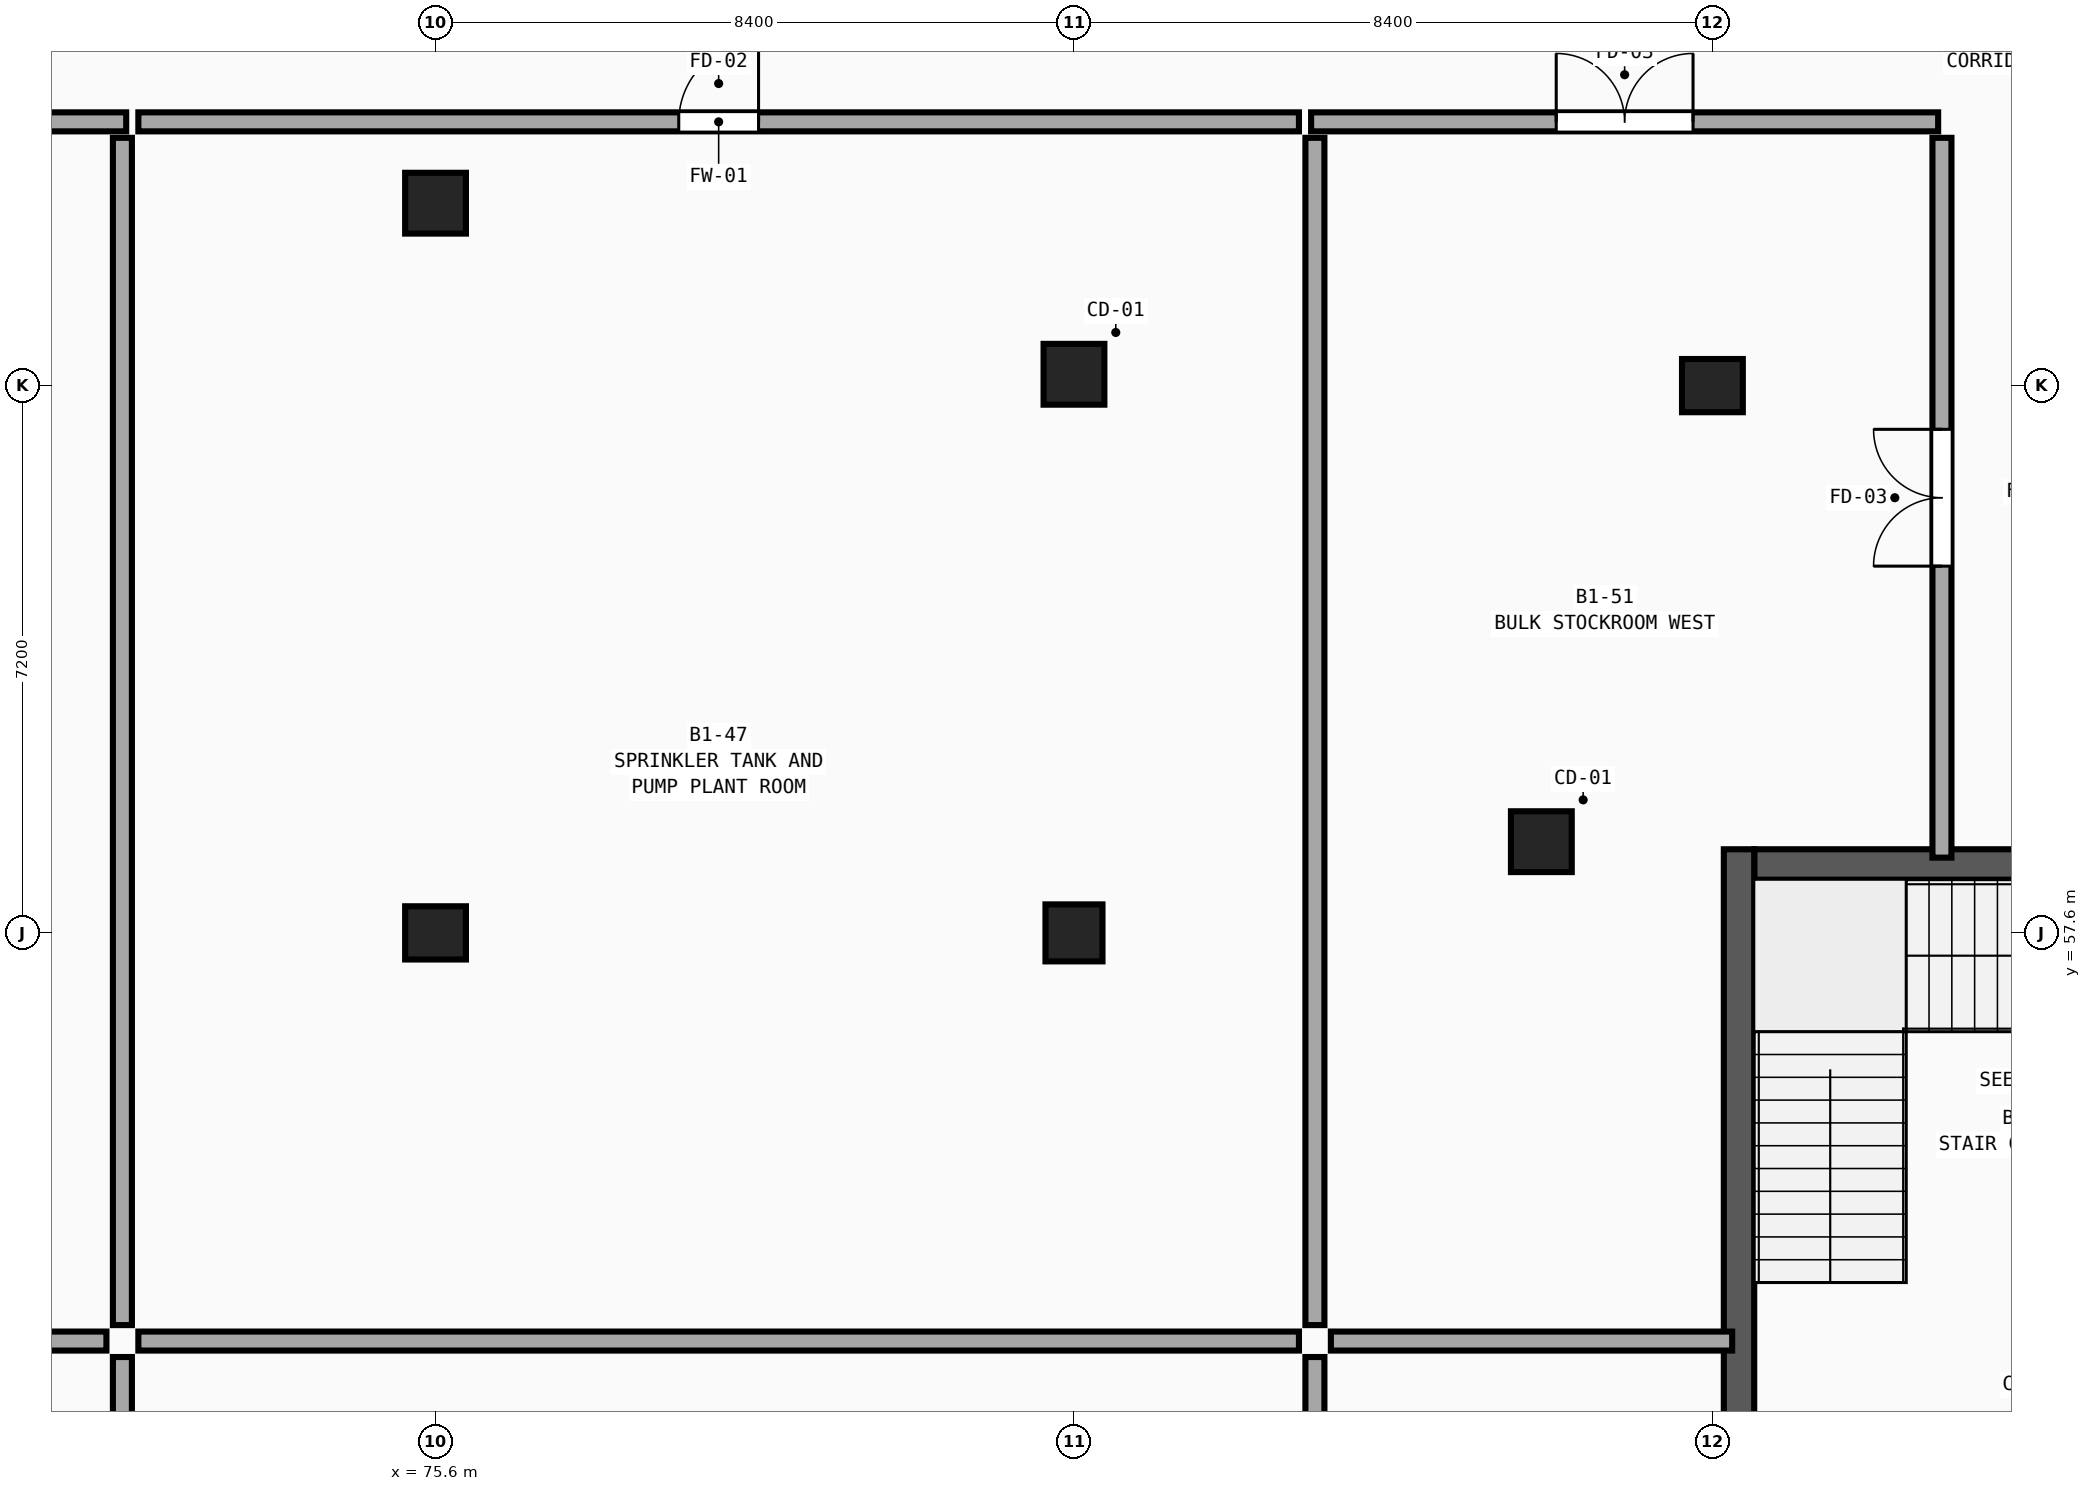
"""IFC4 building model, lengths in metres.
Left out: names, types, materials, properties, quantities, classifications, styles, units other than length and angle.
Written with IfcOpenShell. Run it as: python <this file> out.ifc"""

import sys

from ifc_helpers import new_model, si_unit, direction, frame, frame_2d, origin, origin_2d, place, context, subcontext, project, spatial, rectangle, circle, extrude, element, fill, save


model = new_model("IFC4")
c1 = context("Model", 3, precision=1e-05, world=origin(), true_north=direction((0.0, 1.0)))
c2 = subcontext(c1, "Body", "Model", "MODEL_VIEW")
j1 = project(units=[si_unit("LENGTHUNIT", "METRE"), si_unit("PLANEANGLEUNIT", "RADIAN")], contexts=[c1])
p1 = place(None, origin())
s1 = spatial("IfcSite", under=j1, at=p1, CompositionType="ELEMENT")
p2 = place(p1, origin())
s2 = spatial("IfcBuilding", under=s1, at=p2, CompositionType="ELEMENT")
p3 = place(p2, frame((0.0, 0.0, -5.4)))
s3 = spatial("IfcBuildingStorey", under=s2, at=p3, CompositionType="ELEMENT", Elevation=-5.4)
p4 = place(p3, frame((75.6, 57.6, 0.0), z_axis=(0.0, 0.0, 1.0), x_axis=(1.0, 0.0, 0.0)))
e1 = element("IfcColumn", 1, at=p4, inside=s3, PredefinedType="COLUMN", context=c2, shape_type="SweptSolid", body=[
    extrude(rectangle(XDim=0.8, YDim=0.7, at=origin_2d()), origin(), (0.0, 0.0, 1.0), 5.4),
])
p5 = place(p3, frame((84.0, 57.6, 0.0), z_axis=(0.0, 0.0, 1.0), x_axis=(1.0, 0.0, 0.0)))
e2 = element("IfcColumn", 2, at=p5, inside=s3, PredefinedType="COLUMN", context=c2, shape_type="SweptSolid", body=[
    extrude(rectangle(XDim=0.75, YDim=0.75, at=origin_2d()), origin(), (0.0, 0.0, 1.0), 5.4),
])
p6 = place(p3, frame((92.4, 64.8, 0.0), z_axis=(0.0, 0.0, 1.0), x_axis=(1.0, 0.0, 0.0)))
e3 = element("IfcColumn", 3, at=p6, inside=s3, PredefinedType="COLUMN", context=c2, shape_type="SweptSolid", body=[
    extrude(rectangle(XDim=0.8, YDim=0.7, at=origin_2d()), origin(), (0.0, 0.0, 1.0), 5.4),
])
for number, where, z_axis, x_axis in (
    (4, (90.149, 58.8, 0.0), (0.0, 0.0, 1.0), (1.0, 0.0, 0.0)),
    (5, (84.0, 64.949, 0.0), (0.0, 0.0, 1.0), (1.0, 0.0, 0.0)),
    (6, (75.6, 67.2, 0.0), (0.0, 0.0, 1.0), (1.0, 0.0, 0.0)),
):
    element("IfcColumn", number, at=place(p3, frame(where, z_axis=z_axis, x_axis=x_axis)), inside=s3, PredefinedType="COLUMN", context=c2, shape_type="SweptSolid", body=[
        extrude(circle(Radius=0.4, at=origin_2d()), origin(), (0.0, 0.0, 1.0), 5.4),
    ])
p7 = place(p3, frame((92.95, 58.5, 0.0), z_axis=(0.0, 0.0, 1.0), x_axis=(1.0, 0.0, 0.0)))
e7 = element("IfcWall", 7, at=p7, inside=s3, PredefinedType="SHEAR", context=c2, shape_type="SweptSolid", body=[
    extrude(rectangle(XDim=7.3, YDim=0.4, at=frame_2d((3.65, 0.0))), origin(), (0.0, 0.0, 1.0), 5.4),
])
p8 = place(p3, frame((92.75, 58.7, 0.0), z_axis=(0.0, 0.0, 1.0), x_axis=(0.0, -1.0, 0.0)))
e8 = element("IfcWall", 8, at=p8, inside=s3, PredefinedType="SHEAR", context=c2, shape_type="SweptSolid", body=[
    extrude(rectangle(XDim=8.25, YDim=0.4, at=frame_2d((4.125, 0.0))), origin(), (0.0, 0.0, 1.0), 5.4),
])
p9 = place(p3, frame((55.68, 68.27, 0.0), z_axis=(0.0, 0.0, 1.0), x_axis=(1.0, 0.0, 0.0)))
e9 = element("IfcWall", 9, at=p9, inside=s3, PredefinedType="SOLIDWALL", context=c2, shape_type="SweptSolid", body=[
    extrude(rectangle(XDim=15.85, YDim=0.25, at=frame_2d((7.925, 0.0))), origin(), (0.0, 0.0, 1.0), 5.05),
])
p10 = place(p9, frame((7.025, 0.0, 0.0)))
e10 = element("IfcOpeningElement", 10, at=p10, cuts=e9, PredefinedType="OPENING", context=c2, shape_type="SweptSolid", body=[
    extrude(rectangle(XDim=1.8, YDim=2.3, at=frame_2d((0.9, 1.15))), frame((0.0, 0.145, 0.0), z_axis=(0.0, -1.0, 0.0), x_axis=(1.0, 0.0, 0.0)), (0.0, 0.0, 1.0), 0.29),
])
p11 = place(p3, frame((71.69, 68.27, 0.0), z_axis=(0.0, 0.0, 1.0), x_axis=(1.0, 0.0, 0.0)))
e11 = element("IfcWall", 11, at=p11, inside=s3, PredefinedType="SOLIDWALL", context=c2, shape_type="SweptSolid", body=[
    extrude(rectangle(XDim=15.27, YDim=0.25, at=frame_2d((7.635, 0.0))), origin(), (0.0, 0.0, 1.0), 5.05),
])
p12 = place(p11, frame((7.11, 0.0, 0.0)))
e12 = element("IfcOpeningElement", 12, at=p12, cuts=e11, PredefinedType="OPENING", context=c2, shape_type="SweptSolid", body=[
    extrude(rectangle(XDim=1.05, YDim=2.15, at=frame_2d((0.525, 1.075))), frame((0.0, 0.145, 0.0), z_axis=(0.0, -1.0, 0.0), x_axis=(1.0, 0.0, 0.0)), (0.0, 0.0, 1.0), 0.29),
])
p13 = place(p3, frame((95.42, 58.59, 0.0), z_axis=(0.0, 0.0, 1.0), x_axis=(0.0, 1.0, 0.0)))
e13 = element("IfcWall", 13, at=p13, inside=s3, PredefinedType="SOLIDWALL", context=c2, shape_type="SweptSolid", body=[
    extrude(rectangle(XDim=9.47, YDim=0.25, at=frame_2d((4.735, 0.0))), origin(), (0.0, 0.0, 1.0), 5.05),
])
p14 = place(p13, frame((3.835, 0.0, 0.0)))
e14 = element("IfcOpeningElement", 14, at=p14, cuts=e13, PredefinedType="OPENING", context=c2, shape_type="SweptSolid", body=[
    extrude(rectangle(XDim=1.8, YDim=2.3, at=frame_2d((0.9, 1.15))), frame((0.0, 0.145, 0.0), z_axis=(0.0, -1.0, 0.0), x_axis=(1.0, 0.0, 0.0)), (0.0, 0.0, 1.0), 0.29),
])
p15 = place(p3, frame((87.12, 68.27, 0.0), z_axis=(0.0, 0.0, 1.0), x_axis=(1.0, 0.0, 0.0)))
e15 = element("IfcWall", 15, at=p15, inside=s3, PredefinedType="SOLIDWALL", context=c2, shape_type="SweptSolid", body=[
    extrude(rectangle(XDim=8.25, YDim=0.25, at=frame_2d((4.125, 0.0))), origin(), (0.0, 0.0, 1.0), 5.05),
])
p16 = place(p15, frame((3.225, 0.0, 0.0)))
e16 = element("IfcOpeningElement", 16, at=p16, cuts=e15, PredefinedType="OPENING", context=c2, shape_type="SweptSolid", body=[
    extrude(rectangle(XDim=1.8, YDim=2.3, at=frame_2d((0.9, 1.15))), frame((0.0, 0.145, 0.0), z_axis=(0.0, -1.0, 0.0), x_axis=(1.0, 0.0, 0.0)), (0.0, 0.0, 1.0), 0.29),
])
p17 = place(p3, frame((71.48, 34.505, 0.0), z_axis=(0.0, 0.0, 1.0), x_axis=(0.0, 1.0, 0.0)))
e17 = element("IfcWall", 17, at=p17, inside=s3, PredefinedType="SOLIDWALL", context=c2, shape_type="SweptSolid", body=[
    extrude(rectangle(XDim=17.515, YDim=0.25, at=frame_2d((8.758, 0.0))), origin(), (0.0, 0.0, 1.0), 5.05),
])
p18 = place(p17, frame((7.857, 0.0, 0.0)))
e18 = element("IfcOpeningElement", 18, at=p18, cuts=e17, PredefinedType="OPENING", context=c2, shape_type="SweptSolid", body=[
    extrude(rectangle(XDim=1.8, YDim=2.3, at=frame_2d((0.9, 1.15))), frame((0.0, 0.145, 0.0), z_axis=(0.0, -1.0, 0.0), x_axis=(1.0, 0.0, 0.0)), (0.0, 0.0, 1.0), 0.29),
])
p19 = place(p3, frame((87.17, 34.505, 0.0), z_axis=(0.0, 0.0, 1.0), x_axis=(0.0, 1.0, 0.0)))
e19 = element("IfcWall", 19, at=p19, inside=s3, PredefinedType="SOLIDWALL", context=c2, shape_type="SweptSolid", body=[
    extrude(rectangle(XDim=17.515, YDim=0.25, at=frame_2d((8.758, 0.0))), origin(), (0.0, 0.0, 1.0), 5.05),
])
for number, where, z_axis, x_axis in (
    (20, (71.48, 52.44, 0.0), (0.0, 0.0, 1.0), (0.0, 1.0, 0.0)),
    (21, (87.17, 52.44, 0.0), (0.0, 0.0, 1.0), (0.0, 1.0, 0.0)),
):
    element("IfcWall", number, at=place(p3, frame(where, z_axis=z_axis, x_axis=x_axis)), inside=s3, PredefinedType="SOLIDWALL", context=c2, shape_type="SweptSolid", body=[
        extrude(rectangle(XDim=15.62, YDim=0.25, at=frame_2d((7.81, 0.0))), origin(), (0.0, 0.0, 1.0), 5.05),
    ])
p20 = place(p3, frame((55.84, 52.23, 0.0), z_axis=(0.0, 0.0, 1.0), x_axis=(1.0, 0.0, 0.0)))
e22 = element("IfcWall", 22, at=p20, inside=s3, PredefinedType="SOLIDWALL", context=c2, shape_type="SweptSolid", body=[
    extrude(rectangle(XDim=15.43, YDim=0.25, at=frame_2d((7.715, 0.0))), origin(), (0.0, 0.0, 1.0), 5.05),
])
p21 = place(p3, frame((71.69, 52.23, 0.0), z_axis=(0.0, 0.0, 1.0), x_axis=(1.0, 0.0, 0.0)))
e23 = element("IfcWall", 23, at=p21, inside=s3, PredefinedType="SOLIDWALL", context=c2, shape_type="SweptSolid", body=[
    extrude(rectangle(XDim=15.27, YDim=0.25, at=frame_2d((7.635, 0.0))), origin(), (0.0, 0.0, 1.0), 5.05),
])
p22 = place(p3, frame((87.38, 52.23, 0.0), z_axis=(0.0, 0.0, 1.0), x_axis=(1.0, 0.0, 0.0)))
e24 = element("IfcWall", 24, at=p22, inside=s3, PredefinedType="SOLIDWALL", context=c2, shape_type="SweptSolid", body=[
    extrude(rectangle(XDim=5.28, YDim=0.25, at=frame_2d((2.64, 0.0))), origin(), (0.0, 0.0, 1.0), 5.05),
])
p23 = place(p12, origin())
e25 = element("IfcDoor", 25, at=p23, inside=s3, OperationType="SINGLE_SWING_RIGHT", PredefinedType="DOOR", context=c2, shape_type="SweptSolid", body=[
    extrude(rectangle(XDim=1.05, YDim=2.15, at=frame_2d((0.525, 1.075))), frame((0.0, 0.025, 0.0), z_axis=(0.0, -1.0, 0.0), x_axis=(1.0, 0.0, 0.0)), (0.0, 0.0, 1.0), 0.05),
])
fill(e12, e25)
p24 = place(p14, origin())
e26 = element("IfcDoor", 26, at=p24, inside=s3, OperationType="DOUBLE_DOOR_SINGLE_SWING", PredefinedType="DOOR", context=c2, shape_type="SweptSolid", body=[
    extrude(rectangle(XDim=1.8, YDim=2.3, at=frame_2d((0.9, 1.15))), frame((0.0, 0.025, 0.0), z_axis=(0.0, -1.0, 0.0), x_axis=(1.0, 0.0, 0.0)), (0.0, 0.0, 1.0), 0.05),
])
fill(e14, e26)
p25 = place(p16, origin())
e27 = element("IfcDoor", 27, at=p25, inside=s3, OperationType="DOUBLE_DOOR_SINGLE_SWING", PredefinedType="DOOR", context=c2, shape_type="SweptSolid", body=[
    extrude(rectangle(XDim=1.8, YDim=2.3, at=frame_2d((0.9, 1.15))), frame((0.0, 0.025, 0.0), z_axis=(0.0, -1.0, 0.0), x_axis=(1.0, 0.0, 0.0)), (0.0, 0.0, 1.0), 0.05),
])
fill(e16, e27)
save(model, sys.argv[1])
